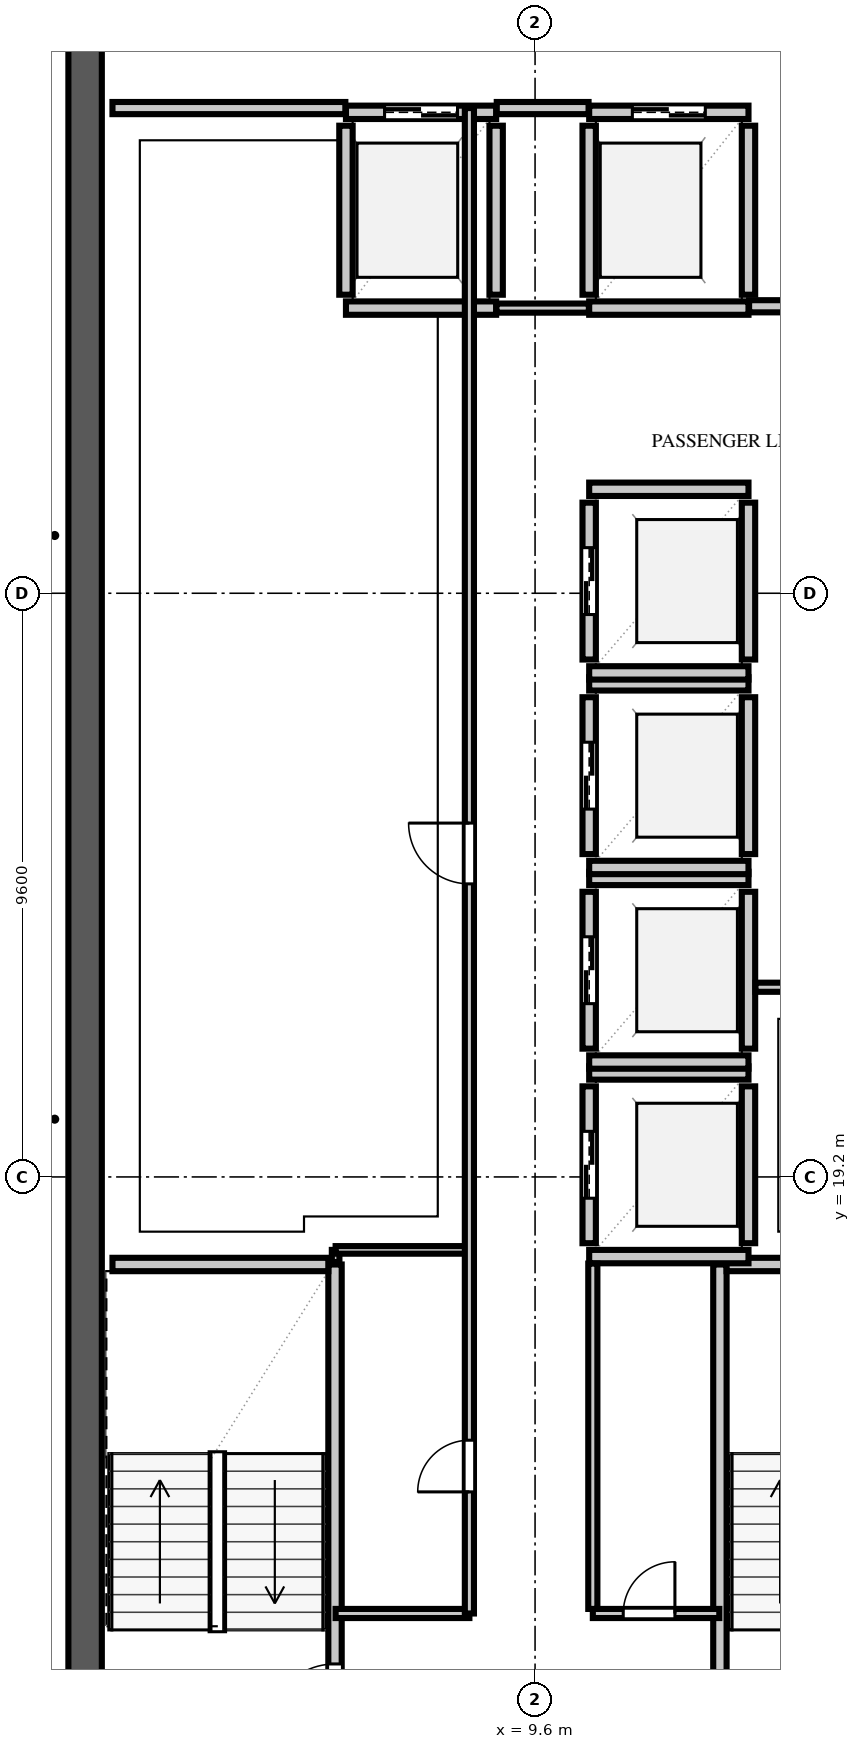
"""IFC4 building model, lengths in metres.
Left out: names, types, materials, properties, quantities, classifications, styles, units other than length and angle.
Written with IfcOpenShell. Run it as: python <this file> out.ifc"""

import sys

from ifc_helpers import new_model, si_unit, direction, frame, frame_2d, origin, place, context, subcontext, project, spatial, rectangle, extrude, element, fill, save


model = new_model("IFC4")
c1 = context("Model", 3, precision=1e-05, world=origin(), true_north=direction((0.0, 1.0)))
c2 = subcontext(c1, "Body", "Model", "MODEL_VIEW")
j1 = project(units=[si_unit("LENGTHUNIT", "METRE"), si_unit("PLANEANGLEUNIT", "RADIAN")], contexts=[c1])
p1 = place(None, origin())
s1 = spatial("IfcSite", under=j1, at=p1, CompositionType="ELEMENT")
p2 = place(p1, origin())
s2 = spatial("IfcBuilding", under=s1, at=p2, CompositionType="ELEMENT")
p3 = place(p2, frame((0.0, 0.0, 292.4)))
s3 = spatial("IfcBuildingStorey", under=s2, at=p3, CompositionType="ELEMENT", Elevation=292.4)
p4 = place(p3, frame((2.2, 9.325, 0.0), z_axis=(0.0, 0.0, 1.0), x_axis=(0.0, 1.0, 0.0)))
e1 = element("IfcWall", 1, at=p4, inside=s3, PredefinedType="SHEAR", context=c2, shape_type="SweptSolid", body=[
    extrude(rectangle(XDim=38.95, YDim=0.55, at=frame_2d((19.475, 0.0))), origin(), (0.0, 0.0, 1.0), 3.54),
])
p5 = place(p3, frame((6.31, 9.95, 0.0), z_axis=(0.0, 0.0, 1.0), x_axis=(0.0, 1.0, 0.0)))
e2 = element("IfcWall", 2, at=p5, inside=s3, PredefinedType="SOLIDWALL", context=c2, shape_type="SweptSolid", body=[
    extrude(rectangle(XDim=7.81, YDim=0.22, at=frame_2d((3.905, 0.0))), origin(), (0.0, 0.0, 1.0), 3.54),
])
p6 = place(p5, frame((0.14, 0.0, 0.0)))
e3 = element("IfcOpeningElement", 3, at=p6, cuts=e2, PredefinedType="OPENING", context=c2, shape_type="SweptSolid", body=[
    extrude(rectangle(XDim=1.1, YDim=2.2, at=frame_2d((0.55, 1.1))), frame((0.0, 0.122, 0.0), z_axis=(0.0, -1.0, 0.0), x_axis=(1.0, 0.0, 0.0)), (0.0, 0.0, 1.0), 0.244),
])
p7 = place(p3, frame((2.65, 17.76, 0.0), z_axis=(0.0, 0.0, 1.0), x_axis=(1.0, 0.0, 0.0)))
e4 = element("IfcWall", 4, at=p7, inside=s3, PredefinedType="SOLIDWALL", context=c2, shape_type="SweptSolid", body=[
    extrude(rectangle(XDim=3.55, YDim=0.22, at=frame_2d((1.775, 0.0))), origin(), (0.0, 0.0, 1.0), 3.54),
])
p8 = place(p3, frame((12.64, 10.05, 0.0), z_axis=(0.0, 0.0, 1.0), x_axis=(0.0, 1.0, 0.0)))
e5 = element("IfcWall", 5, at=p8, inside=s3, PredefinedType="SOLIDWALL", context=c2, shape_type="SweptSolid", body=[
    extrude(rectangle(XDim=7.71, YDim=0.22, at=frame_2d((3.855, 0.0))), origin(), (0.0, 0.0, 1.0), 3.54),
])
p9 = place(p3, frame((12.75, 17.76, 0.0), z_axis=(0.0, 0.0, 1.0), x_axis=(1.0, 0.0, 0.0)))
e6 = element("IfcWall", 6, at=p9, inside=s3, PredefinedType="SOLIDWALL", context=c2, shape_type="SweptSolid", body=[
    extrude(rectangle(XDim=3.6, YDim=0.22, at=frame_2d((1.8, 0.0))), origin(), (0.0, 0.0, 1.0), 3.54),
])
p10 = place(p3, frame((10.49, 18.11, 0.0), z_axis=(0.0, 0.0, 1.0), x_axis=(0.0, 1.0, 0.0)))
e7 = element("IfcWall", 7, at=p10, inside=s3, PredefinedType="SOLIDWALL", context=c2, shape_type="SweptSolid", body=[
    extrude(rectangle(XDim=2.58, YDim=0.22, at=frame_2d((1.29, 0.0))), origin(), (0.0, 0.0, 1.0), 3.54),
])
p11 = place(p10, frame((0.74, 0.0, 0.0)))
e8 = element("IfcOpeningElement", 8, at=p11, cuts=e7, PredefinedType="OPENING", context=c2, shape_type="SweptSolid", body=[
    extrude(rectangle(XDim=1.1, YDim=2.2, at=frame_2d((0.55, 1.1))), frame((0.0, 0.122, 0.0), z_axis=(0.0, -1.0, 0.0), x_axis=(1.0, 0.0, 0.0)), (0.0, 0.0, 1.0), 0.244),
])
p12 = place(p3, frame((13.11, 18.11, 0.0), z_axis=(0.0, 0.0, 1.0), x_axis=(0.0, 1.0, 0.0)))
e9 = element("IfcWall", 9, at=p12, inside=s3, PredefinedType="SOLIDWALL", context=c2, shape_type="SweptSolid", body=[
    extrude(rectangle(XDim=2.58, YDim=0.22, at=frame_2d((1.29, 0.0))), origin(), (0.0, 0.0, 1.0), 3.54),
])
for number, where, z_axis, x_axis in (
    (10, (10.49, 17.89, 0.0), (0.0, 0.0, 1.0), (1.0, 0.0, 0.0)),
    (11, (10.49, 20.91, 0.0), (0.0, 0.0, 1.0), (1.0, 0.0, 0.0)),
):
    element("IfcWall", number, at=place(p3, frame(where, z_axis=z_axis, x_axis=x_axis)), inside=s3, PredefinedType="SOLIDWALL", context=c2, shape_type="SweptSolid", body=[
        extrude(rectangle(XDim=2.62, YDim=0.22, at=frame_2d((1.31, 0.0))), origin(), (0.0, 0.0, 1.0), 3.54),
    ])
p13 = place(p3, frame((10.49, 21.31, 0.0), z_axis=(0.0, 0.0, 1.0), x_axis=(0.0, 1.0, 0.0)))
e12 = element("IfcWall", 12, at=p13, inside=s3, PredefinedType="SOLIDWALL", context=c2, shape_type="SweptSolid", body=[
    extrude(rectangle(XDim=2.58, YDim=0.22, at=frame_2d((1.29, 0.0))), origin(), (0.0, 0.0, 1.0), 3.54),
])
p14 = place(p13, frame((0.74, 0.0, 0.0)))
e13 = element("IfcOpeningElement", 13, at=p14, cuts=e12, PredefinedType="OPENING", context=c2, shape_type="SweptSolid", body=[
    extrude(rectangle(XDim=1.1, YDim=2.2, at=frame_2d((0.55, 1.1))), frame((0.0, 0.122, 0.0), z_axis=(0.0, -1.0, 0.0), x_axis=(1.0, 0.0, 0.0)), (0.0, 0.0, 1.0), 0.244),
])
p15 = place(p3, frame((13.11, 21.31, 0.0), z_axis=(0.0, 0.0, 1.0), x_axis=(0.0, 1.0, 0.0)))
e14 = element("IfcWall", 14, at=p15, inside=s3, PredefinedType="SOLIDWALL", context=c2, shape_type="SweptSolid", body=[
    extrude(rectangle(XDim=2.58, YDim=0.22, at=frame_2d((1.29, 0.0))), origin(), (0.0, 0.0, 1.0), 3.54),
])
for number, where, z_axis, x_axis in (
    (15, (10.49, 21.09, 0.0), (0.0, 0.0, 1.0), (1.0, 0.0, 0.0)),
    (16, (10.49, 24.11, 0.0), (0.0, 0.0, 1.0), (1.0, 0.0, 0.0)),
):
    element("IfcWall", number, at=place(p3, frame(where, z_axis=z_axis, x_axis=x_axis)), inside=s3, PredefinedType="SOLIDWALL", context=c2, shape_type="SweptSolid", body=[
        extrude(rectangle(XDim=2.62, YDim=0.22, at=frame_2d((1.31, 0.0))), origin(), (0.0, 0.0, 1.0), 3.54),
    ])
p16 = place(p3, frame((10.49, 24.51, 0.0), z_axis=(0.0, 0.0, 1.0), x_axis=(0.0, 1.0, 0.0)))
e17 = element("IfcWall", 17, at=p16, inside=s3, PredefinedType="SOLIDWALL", context=c2, shape_type="SweptSolid", body=[
    extrude(rectangle(XDim=2.58, YDim=0.22, at=frame_2d((1.29, 0.0))), origin(), (0.0, 0.0, 1.0), 3.54),
])
p17 = place(p16, frame((0.74, 0.0, 0.0)))
e18 = element("IfcOpeningElement", 18, at=p17, cuts=e17, PredefinedType="OPENING", context=c2, shape_type="SweptSolid", body=[
    extrude(rectangle(XDim=1.1, YDim=2.2, at=frame_2d((0.55, 1.1))), frame((0.0, 0.122, 0.0), z_axis=(0.0, -1.0, 0.0), x_axis=(1.0, 0.0, 0.0)), (0.0, 0.0, 1.0), 0.244),
])
p18 = place(p3, frame((13.11, 24.51, 0.0), z_axis=(0.0, 0.0, 1.0), x_axis=(0.0, 1.0, 0.0)))
e19 = element("IfcWall", 19, at=p18, inside=s3, PredefinedType="SOLIDWALL", context=c2, shape_type="SweptSolid", body=[
    extrude(rectangle(XDim=2.58, YDim=0.22, at=frame_2d((1.29, 0.0))), origin(), (0.0, 0.0, 1.0), 3.54),
])
for number, where, z_axis, x_axis in (
    (20, (10.49, 24.29, 0.0), (0.0, 0.0, 1.0), (1.0, 0.0, 0.0)),
    (21, (10.49, 27.31, 0.0), (0.0, 0.0, 1.0), (1.0, 0.0, 0.0)),
):
    element("IfcWall", number, at=place(p3, frame(where, z_axis=z_axis, x_axis=x_axis)), inside=s3, PredefinedType="SOLIDWALL", context=c2, shape_type="SweptSolid", body=[
        extrude(rectangle(XDim=2.62, YDim=0.22, at=frame_2d((1.31, 0.0))), origin(), (0.0, 0.0, 1.0), 3.54),
    ])
p19 = place(p3, frame((10.49, 27.71, 0.0), z_axis=(0.0, 0.0, 1.0), x_axis=(0.0, 1.0, 0.0)))
e22 = element("IfcWall", 22, at=p19, inside=s3, PredefinedType="SOLIDWALL", context=c2, shape_type="SweptSolid", body=[
    extrude(rectangle(XDim=2.58, YDim=0.22, at=frame_2d((1.29, 0.0))), origin(), (0.0, 0.0, 1.0), 3.54),
])
p20 = place(p19, frame((0.74, 0.0, 0.0)))
e23 = element("IfcOpeningElement", 23, at=p20, cuts=e22, PredefinedType="OPENING", context=c2, shape_type="SweptSolid", body=[
    extrude(rectangle(XDim=1.1, YDim=2.2, at=frame_2d((0.55, 1.1))), frame((0.0, 0.122, 0.0), z_axis=(0.0, -1.0, 0.0), x_axis=(1.0, 0.0, 0.0)), (0.0, 0.0, 1.0), 0.244),
])
p21 = place(p3, frame((13.11, 27.71, 0.0), z_axis=(0.0, 0.0, 1.0), x_axis=(0.0, 1.0, 0.0)))
e24 = element("IfcWall", 24, at=p21, inside=s3, PredefinedType="SOLIDWALL", context=c2, shape_type="SweptSolid", body=[
    extrude(rectangle(XDim=2.58, YDim=0.22, at=frame_2d((1.29, 0.0))), origin(), (0.0, 0.0, 1.0), 3.54),
])
for number, where, z_axis, x_axis in (
    (25, (10.49, 27.49, 0.0), (0.0, 0.0, 1.0), (1.0, 0.0, 0.0)),
    (26, (10.49, 30.51, 0.0), (0.0, 0.0, 1.0), (1.0, 0.0, 0.0)),
):
    element("IfcWall", number, at=place(p3, frame(where, z_axis=z_axis, x_axis=x_axis)), inside=s3, PredefinedType="SOLIDWALL", context=c2, shape_type="SweptSolid", body=[
        extrude(rectangle(XDim=2.62, YDim=0.22, at=frame_2d((1.31, 0.0))), origin(), (0.0, 0.0, 1.0), 3.54),
    ])
for number, where, z_axis, x_axis in (
    (27, (6.49, 33.71, 0.0), (0.0, 0.0, 1.0), (0.0, 1.0, 0.0)),
    (28, (8.96, 33.71, 0.0), (0.0, 0.0, 1.0), (0.0, 1.0, 0.0)),
):
    element("IfcWall", number, at=place(p3, frame(where, z_axis=z_axis, x_axis=x_axis)), inside=s3, PredefinedType="SOLIDWALL", context=c2, shape_type="SweptSolid", body=[
        extrude(rectangle(XDim=2.78, YDim=0.22, at=frame_2d((1.39, 0.0))), origin(), (0.0, 0.0, 1.0), 3.54),
    ])
p22 = place(p3, frame((6.49, 33.49, 0.0), z_axis=(0.0, 0.0, 1.0), x_axis=(1.0, 0.0, 0.0)))
e29 = element("IfcWall", 29, at=p22, inside=s3, PredefinedType="SOLIDWALL", context=c2, shape_type="SweptSolid", body=[
    extrude(rectangle(XDim=2.47, YDim=0.22, at=frame_2d((1.235, 0.0))), origin(), (0.0, 0.0, 1.0), 3.54),
])
p23 = place(p3, frame((6.49, 36.71, 0.0), z_axis=(0.0, 0.0, 1.0), x_axis=(1.0, 0.0, 0.0)))
e30 = element("IfcWall", 30, at=p23, inside=s3, PredefinedType="SOLIDWALL", context=c2, shape_type="SweptSolid", body=[
    extrude(rectangle(XDim=2.47, YDim=0.22, at=frame_2d((1.235, 0.0))), origin(), (0.0, 0.0, 1.0), 3.54),
])
p24 = place(p23, frame((0.635, 0.0, 0.0)))
e31 = element("IfcOpeningElement", 31, at=p24, cuts=e30, PredefinedType="OPENING", context=c2, shape_type="SweptSolid", body=[
    extrude(rectangle(XDim=1.2, YDim=2.2, at=frame_2d((0.6, 1.1))), frame((0.0, 0.122, 0.0), z_axis=(0.0, -1.0, 0.0), x_axis=(1.0, 0.0, 0.0)), (0.0, 0.0, 1.0), 0.244),
])
for number, where, z_axis, x_axis in (
    (32, (10.49, 33.71, 0.0), (0.0, 0.0, 1.0), (0.0, 1.0, 0.0)),
    (33, (13.11, 33.71, 0.0), (0.0, 0.0, 1.0), (0.0, 1.0, 0.0)),
):
    element("IfcWall", number, at=place(p3, frame(where, z_axis=z_axis, x_axis=x_axis)), inside=s3, PredefinedType="SOLIDWALL", context=c2, shape_type="SweptSolid", body=[
        extrude(rectangle(XDim=2.78, YDim=0.22, at=frame_2d((1.39, 0.0))), origin(), (0.0, 0.0, 1.0), 3.54),
    ])
p25 = place(p3, frame((10.49, 33.49, 0.0), z_axis=(0.0, 0.0, 1.0), x_axis=(1.0, 0.0, 0.0)))
e34 = element("IfcWall", 34, at=p25, inside=s3, PredefinedType="SOLIDWALL", context=c2, shape_type="SweptSolid", body=[
    extrude(rectangle(XDim=2.62, YDim=0.22, at=frame_2d((1.31, 0.0))), origin(), (0.0, 0.0, 1.0), 3.54),
])
p26 = place(p3, frame((10.49, 36.71, 0.0), z_axis=(0.0, 0.0, 1.0), x_axis=(1.0, 0.0, 0.0)))
e35 = element("IfcWall", 35, at=p26, inside=s3, PredefinedType="SOLIDWALL", context=c2, shape_type="SweptSolid", body=[
    extrude(rectangle(XDim=2.62, YDim=0.22, at=frame_2d((1.31, 0.0))), origin(), (0.0, 0.0, 1.0), 3.54),
])
p27 = place(p26, frame((0.71, 0.0, 0.0)))
e36 = element("IfcOpeningElement", 36, at=p27, cuts=e35, PredefinedType="OPENING", context=c2, shape_type="SweptSolid", body=[
    extrude(rectangle(XDim=1.2, YDim=2.2, at=frame_2d((0.6, 1.1))), frame((0.0, 0.122, 0.0), z_axis=(0.0, -1.0, 0.0), x_axis=(1.0, 0.0, 0.0)), (0.0, 0.0, 1.0), 0.244),
])
p28 = place(p3, frame((2.65, 36.78, 0.0), z_axis=(0.0, 0.0, 1.0), x_axis=(1.0, 0.0, 0.0)))
e37 = element("IfcWall", 37, at=p28, inside=s3, PredefinedType="SOLIDWALL", context=c2, shape_type="SweptSolid", body=[
    extrude(rectangle(XDim=3.83, YDim=0.2, at=frame_2d((1.915, 0.0))), origin(), (0.0, 0.0, 1.0), 3.54),
])
p29 = place(p3, frame((8.97, 36.78, 0.0), z_axis=(0.0, 0.0, 1.0), x_axis=(1.0, 0.0, 0.0)))
e38 = element("IfcWall", 38, at=p29, inside=s3, PredefinedType="SOLIDWALL", context=c2, shape_type="SweptSolid", body=[
    extrude(rectangle(XDim=1.51, YDim=0.2, at=frame_2d((0.755, 0.0))), origin(), (0.0, 0.0, 1.0), 3.54),
])
p30 = place(p3, frame((13.12, 33.52, 0.0), z_axis=(0.0, 0.0, 1.0), x_axis=(1.0, 0.0, 0.0)))
e39 = element("IfcWall", 39, at=p30, inside=s3, PredefinedType="SOLIDWALL", context=c2, shape_type="SweptSolid", body=[
    extrude(rectangle(XDim=3.33, YDim=0.2, at=frame_2d((1.665, 0.0))), origin(), (0.0, 0.0, 1.0), 3.54),
])
p31 = place(p3, frame((8.965, 33.49, 0.0), z_axis=(0.0, 0.0, 1.0), x_axis=(1.0, 0.0, 0.0)))
e40 = element("IfcWall", 40, at=p31, inside=s3, PredefinedType="PARTITIONING", context=c2, shape_type="SweptSolid", body=[
    extrude(rectangle(XDim=1.52, YDim=0.15, at=frame_2d((0.76, 0.0))), origin(), (0.0, 0.0, 1.0), 3.54),
])
p32 = place(p3, frame((10.55, 12.02, 0.0), z_axis=(0.0, 0.0, 1.0), x_axis=(1.0, 0.0, 0.0)))
e41 = element("IfcWall", 41, at=p32, inside=s3, PredefinedType="PARTITIONING", context=c2, shape_type="SweptSolid", body=[
    extrude(rectangle(XDim=2.08, YDim=0.15, at=frame_2d((1.04, 0.0))), origin(), (0.0, 0.0, 1.0), 3.54),
])
p33 = place(p32, frame((0.5, 0.0, 0.0)))
e42 = element("IfcOpeningElement", 42, at=p33, cuts=e41, PredefinedType="OPENING", context=c2, shape_type="SweptSolid", body=[
    extrude(rectangle(XDim=0.85, YDim=2.1, at=frame_2d((0.425, 1.05))), frame((0.0, 0.087, 0.0), z_axis=(0.0, -1.0, 0.0), x_axis=(1.0, 0.0, 0.0)), (0.0, 0.0, 1.0), 0.174),
])
p34 = place(p3, frame((10.55, 12.095, 0.0), z_axis=(0.0, 0.0, 1.0), x_axis=(0.0, 1.0, 0.0)))
e43 = element("IfcWall", 43, at=p34, inside=s3, PredefinedType="PARTITIONING", context=c2, shape_type="SweptSolid", body=[
    extrude(rectangle(XDim=5.68, YDim=0.15, at=frame_2d((2.84, 0.0))), origin(), (0.0, 0.0, 1.0), 3.54),
])
p35 = place(p3, frame((13.225, 22.32, 0.0), z_axis=(0.0, 0.0, 1.0), x_axis=(1.0, 0.0, 0.0)))
e44 = element("IfcWall", 44, at=p35, inside=s3, PredefinedType="PARTITIONING", context=c2, shape_type="SweptSolid", body=[
    extrude(rectangle(XDim=3.12, YDim=0.15, at=frame_2d((1.56, 0.0))), origin(), (0.0, 0.0, 1.0), 3.54),
])
p36 = place(p35, frame((1.0, 0.0, 0.0)))
e45 = element("IfcOpeningElement", 45, at=p36, cuts=e44, PredefinedType="OPENING", context=c2, shape_type="SweptSolid", body=[
    extrude(rectangle(XDim=0.85, YDim=2.1, at=frame_2d((0.425, 1.05))), frame((0.0, 0.087, 0.0), z_axis=(0.0, -1.0, 0.0), x_axis=(1.0, 0.0, 0.0)), (0.0, 0.0, 1.0), 0.174),
])
p37 = place(p3, frame((6.32, 12.02, 0.0), z_axis=(0.0, 0.0, 1.0), x_axis=(1.0, 0.0, 0.0)))
e46 = element("IfcWall", 46, at=p37, inside=s3, PredefinedType="PARTITIONING", context=c2, shape_type="SweptSolid", body=[
    extrude(rectangle(XDim=2.2, YDim=0.15, at=frame_2d((1.1, 0.0))), origin(), (0.0, 0.0, 1.0), 3.54),
])
p38 = place(p3, frame((6.32, 17.8, 0.0), z_axis=(0.0, 0.0, 1.0), x_axis=(0.0, 1.0, 0.0)))
e47 = element("IfcWall", 47, at=p38, inside=s3, PredefinedType="PARTITIONING", context=c2, shape_type="SweptSolid", body=[
    extrude(rectangle(XDim=0.2, YDim=0.125, at=frame_2d((0.1, 0.0))), origin(), (0.0, 0.0, 1.0), 3.54),
])
p39 = place(p3, frame((6.32, 18.0, 0.0), z_axis=(0.0, 0.0, 1.0), x_axis=(1.0, 0.0, 0.0)))
e48 = element("IfcWall", 48, at=p39, inside=s3, PredefinedType="PARTITIONING", context=c2, shape_type="SweptSolid", body=[
    extrude(rectangle(XDim=2.2, YDim=0.125, at=frame_2d((1.1, 0.0))), origin(), (0.0, 0.0, 1.0), 3.54),
])
p40 = place(p3, frame((8.52, 12.02, 0.0), z_axis=(0.0, 0.0, 1.0), x_axis=(0.0, 1.0, 0.0)))
e49 = element("IfcWall", 49, at=p40, inside=s3, PredefinedType="PARTITIONING", context=c2, shape_type="SweptSolid", body=[
    extrude(rectangle(XDim=24.76, YDim=0.15, at=frame_2d((12.38, 0.0))), origin(), (0.0, 0.0, 1.0), 3.54),
])
p41 = place(p40, frame((2.0, 0.0, 0.0)))
e50 = element("IfcOpeningElement", 50, at=p41, cuts=e49, PredefinedType="OPENING", context=c2, shape_type="SweptSolid", body=[
    extrude(rectangle(XDim=0.85, YDim=2.1, at=frame_2d((0.425, 1.05))), frame((0.0, 0.087, 0.0), z_axis=(0.0, -1.0, 0.0), x_axis=(1.0, 0.0, 0.0)), (0.0, 0.0, 1.0), 0.174),
])
p42 = place(p40, frame((12.0, 0.0, 0.0)))
e51 = element("IfcOpeningElement", 51, at=p42, cuts=e49, PredefinedType="OPENING", context=c2, shape_type="SweptSolid", body=[
    extrude(rectangle(XDim=1.0, YDim=2.2, at=frame_2d((0.5, 1.1))), frame((0.0, 0.087, 0.0), z_axis=(0.0, -1.0, 0.0), x_axis=(1.0, 0.0, 0.0)), (0.0, 0.0, 1.0), 0.174),
])
p43 = place(p6, origin())
e52 = element("IfcDoor", 52, at=p43, inside=s3, OperationType="SINGLE_SWING_LEFT", PredefinedType="DOOR", context=c2, shape_type="SweptSolid", body=[
    extrude(rectangle(XDim=1.1, YDim=2.2, at=frame_2d((0.55, 1.1))), frame((0.0, 0.025, 0.0), z_axis=(0.0, -1.0, 0.0), x_axis=(1.0, 0.0, 0.0)), (0.0, 0.0, 1.0), 0.05),
])
fill(e3, e52)
p44 = place(p11, origin())
e53 = element("IfcDoor", 53, at=p44, inside=s3, OperationType="DOUBLE_DOOR_SLIDING", PredefinedType="DOOR", context=c2, shape_type="SweptSolid", body=[
    extrude(rectangle(XDim=1.1, YDim=2.2, at=frame_2d((0.55, 1.1))), frame((0.0, 0.025, 0.0), z_axis=(0.0, -1.0, 0.0), x_axis=(1.0, 0.0, 0.0)), (0.0, 0.0, 1.0), 0.05),
])
fill(e8, e53)
p45 = place(p14, origin())
e54 = element("IfcDoor", 54, at=p45, inside=s3, OperationType="DOUBLE_DOOR_SLIDING", PredefinedType="DOOR", context=c2, shape_type="SweptSolid", body=[
    extrude(rectangle(XDim=1.1, YDim=2.2, at=frame_2d((0.55, 1.1))), frame((0.0, 0.025, 0.0), z_axis=(0.0, -1.0, 0.0), x_axis=(1.0, 0.0, 0.0)), (0.0, 0.0, 1.0), 0.05),
])
fill(e13, e54)
p46 = place(p17, origin())
e55 = element("IfcDoor", 55, at=p46, inside=s3, OperationType="DOUBLE_DOOR_SLIDING", PredefinedType="DOOR", context=c2, shape_type="SweptSolid", body=[
    extrude(rectangle(XDim=1.1, YDim=2.2, at=frame_2d((0.55, 1.1))), frame((0.0, 0.025, 0.0), z_axis=(0.0, -1.0, 0.0), x_axis=(1.0, 0.0, 0.0)), (0.0, 0.0, 1.0), 0.05),
])
fill(e18, e55)
p47 = place(p20, origin())
e56 = element("IfcDoor", 56, at=p47, inside=s3, OperationType="DOUBLE_DOOR_SLIDING", PredefinedType="DOOR", context=c2, shape_type="SweptSolid", body=[
    extrude(rectangle(XDim=1.1, YDim=2.2, at=frame_2d((0.55, 1.1))), frame((0.0, 0.025, 0.0), z_axis=(0.0, -1.0, 0.0), x_axis=(1.0, 0.0, 0.0)), (0.0, 0.0, 1.0), 0.05),
])
fill(e23, e56)
p48 = place(p24, origin())
e57 = element("IfcDoor", 57, at=p48, inside=s3, OperationType="DOUBLE_DOOR_SLIDING", PredefinedType="DOOR", context=c2, shape_type="SweptSolid", body=[
    extrude(rectangle(XDim=1.2, YDim=2.2, at=frame_2d((0.6, 1.1))), frame((0.0, 0.025, 0.0), z_axis=(0.0, -1.0, 0.0), x_axis=(1.0, 0.0, 0.0)), (0.0, 0.0, 1.0), 0.05),
])
fill(e31, e57)
p49 = place(p27, origin())
e58 = element("IfcDoor", 58, at=p49, inside=s3, OperationType="DOUBLE_DOOR_SLIDING", PredefinedType="DOOR", context=c2, shape_type="SweptSolid", body=[
    extrude(rectangle(XDim=1.2, YDim=2.2, at=frame_2d((0.6, 1.1))), frame((0.0, 0.025, 0.0), z_axis=(0.0, -1.0, 0.0), x_axis=(1.0, 0.0, 0.0)), (0.0, 0.0, 1.0), 0.05),
])
fill(e36, e58)
p50 = place(p33, origin())
e59 = element("IfcDoor", 59, at=p50, inside=s3, OperationType="SINGLE_SWING_RIGHT", PredefinedType="DOOR", context=c2, shape_type="SweptSolid", body=[
    extrude(rectangle(XDim=0.85, YDim=2.1, at=frame_2d((0.425, 1.05))), frame((0.0, 0.025, 0.0), z_axis=(0.0, -1.0, 0.0), x_axis=(1.0, 0.0, 0.0)), (0.0, 0.0, 1.0), 0.05),
])
fill(e42, e59)
p51 = place(p41, origin())
e60 = element("IfcDoor", 60, at=p51, inside=s3, OperationType="SINGLE_SWING_LEFT", PredefinedType="DOOR", context=c2, shape_type="SweptSolid", body=[
    extrude(rectangle(XDim=0.85, YDim=2.1, at=frame_2d((0.425, 1.05))), frame((0.0, 0.025, 0.0), z_axis=(0.0, -1.0, 0.0), x_axis=(1.0, 0.0, 0.0)), (0.0, 0.0, 1.0), 0.05),
])
fill(e50, e60)
p52 = place(p42, origin())
e61 = element("IfcDoor", 61, at=p52, inside=s3, OperationType="SINGLE_SWING_RIGHT", PredefinedType="DOOR", context=c2, shape_type="SweptSolid", body=[
    extrude(rectangle(XDim=1.0, YDim=2.2, at=frame_2d((0.5, 1.1))), frame((0.0, 0.025, 0.0), z_axis=(0.0, -1.0, 0.0), x_axis=(1.0, 0.0, 0.0)), (0.0, 0.0, 1.0), 0.05),
])
fill(e51, e61)
save(model, sys.argv[1])
